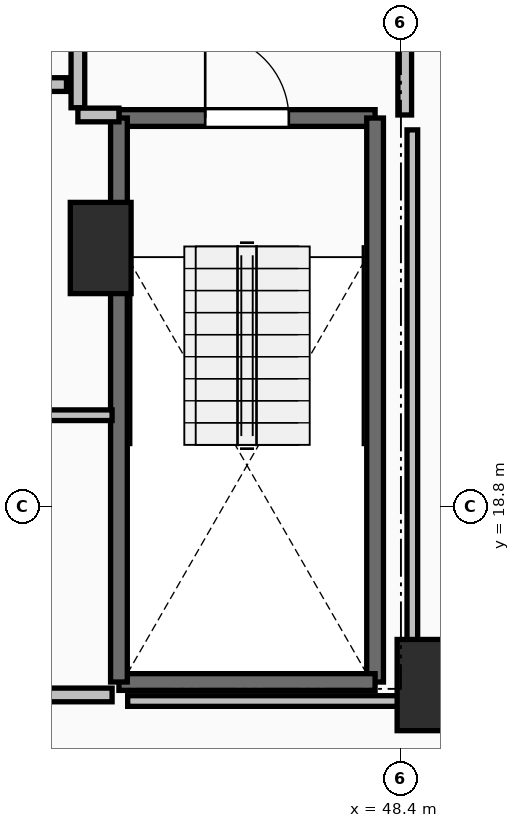
"""IFC4 building model, lengths in metres.
Left out: names, types, materials, properties, quantities, classifications, styles, units other than length and angle.
Written with IfcOpenShell. Run it as: python <this file> out.ifc"""

import sys

from ifc_helpers import new_model, si_unit, direction, frame, frame_2d, origin, origin_2d, place, context, subcontext, project, spatial, rectangle, extrude, element, fill, save


model = new_model("IFC4")
c1 = context("Model", 3, precision=1e-05, world=origin(), true_north=direction((0.0, 1.0)))
c2 = subcontext(c1, "Body", "Model", "MODEL_VIEW")
j1 = project(units=[si_unit("LENGTHUNIT", "METRE"), si_unit("PLANEANGLEUNIT", "RADIAN")], contexts=[c1])
p1 = place(None, origin())
s1 = spatial("IfcSite", under=j1, at=p1, CompositionType="ELEMENT")
p2 = place(p1, origin())
s2 = spatial("IfcBuilding", under=s1, at=p2, CompositionType="ELEMENT")
p3 = place(p2, frame((0.0, 0.0, 164.1)))
s3 = spatial("IfcBuildingStorey", under=s2, at=p3, CompositionType="ELEMENT", Elevation=164.1)
for number, where, z_axis, x_axis in (
    (1, (48.75, 16.45, 0.0), (0.0, 0.0, 1.0), (1.0, 0.0, 0.0)),
    (2, (44.45, 22.2, 0.0), (0.0, 0.0, 1.0), (1.0, 0.0, 0.0)),
):
    element("IfcColumn", number, at=place(p3, frame(where, z_axis=z_axis, x_axis=x_axis)), inside=s3, PredefinedType="PILASTER", context=c2, shape_type="SweptSolid", body=[
        extrude(rectangle(XDim=0.8, YDim=1.2, at=origin_2d()), origin(), (0.0, 0.0, 1.0), 3.5),
    ])
p4 = place(p3, frame((44.69, 23.91, 0.0), z_axis=(0.0, 0.0, 1.0), x_axis=(1.0, 0.0, 0.0)))
e3 = element("IfcWall", 3, at=p4, inside=s3, PredefinedType="SOLIDWALL", context=c2, shape_type="SweptSolid", body=[
    extrude(rectangle(XDim=3.37, YDim=0.22, at=frame_2d((1.685, 0.0))), origin(), (0.0, 0.0, 1.0), 3.24),
])
p5 = place(p4, frame((1.135, 0.0, 0.0)))
e4 = element("IfcOpeningElement", 4, at=p5, cuts=e3, PredefinedType="OPENING", context=c2, shape_type="SweptSolid", body=[
    extrude(rectangle(XDim=1.1, YDim=2.15, at=frame_2d((0.55, 1.075))), frame((0.0, 0.125, 0.0), z_axis=(0.0, -1.0, 0.0), x_axis=(1.0, 0.0, 0.0)), (0.0, 0.0, 1.0), 0.25),
])
p6 = place(p3, frame((48.06, 23.91, 0.0), z_axis=(0.0, 0.0, 1.0), x_axis=(0.0, -1.0, 0.0)))
e5 = element("IfcWall", 5, at=p6, inside=s3, PredefinedType="SOLIDWALL", context=c2, shape_type="SweptSolid", body=[
    extrude(rectangle(XDim=7.42, YDim=0.22, at=frame_2d((3.71, 0.0))), origin(), (0.0, 0.0, 1.0), 3.24),
])
p7 = place(p3, frame((48.06, 16.49, 0.0), z_axis=(0.0, 0.0, 1.0), x_axis=(-1.0, 0.0, 0.0)))
e6 = element("IfcWall", 6, at=p7, inside=s3, PredefinedType="SOLIDWALL", context=c2, shape_type="SweptSolid", body=[
    extrude(rectangle(XDim=3.37, YDim=0.22, at=frame_2d((1.685, 0.0))), origin(), (0.0, 0.0, 1.0), 3.24),
])
p8 = place(p3, frame((44.69, 16.49, 0.0), z_axis=(0.0, 0.0, 1.0), x_axis=(0.0, 1.0, 0.0)))
e7 = element("IfcWall", 7, at=p8, inside=s3, PredefinedType="SOLIDWALL", context=c2, shape_type="SweptSolid", body=[
    extrude(rectangle(XDim=7.42, YDim=0.22, at=frame_2d((3.71, 0.0))), origin(), (0.0, 0.0, 1.0), 3.24),
])
p9 = place(p3, frame((44.15, 27.955, 0.0), z_axis=(0.0, 0.0, 1.0), x_axis=(0.0, -1.0, 0.0)))
e8 = element("IfcWall", 8, at=p9, inside=s3, PredefinedType="PARTITIONING", context=c2, shape_type="SweptSolid", body=[
    extrude(rectangle(XDim=3.91, YDim=0.18, at=frame_2d((1.955, 0.0))), origin(), (0.0, 0.0, 1.0), 3.24),
])
p10 = place(p9, frame((1.355, 0.0, 0.0)))
e9 = element("IfcOpeningElement", 9, at=p10, cuts=e8, PredefinedType="OPENING", context=c2, shape_type="SweptSolid", body=[
    extrude(rectangle(XDim=1.2, YDim=2.15, at=frame_2d((0.6, 1.075))), frame((0.0, 0.105, 0.0), z_axis=(0.0, -1.0, 0.0), x_axis=(1.0, 0.0, 0.0)), (0.0, 0.0, 1.0), 0.21),
])
p11 = place(p3, frame((44.15, 23.95, 0.0), z_axis=(0.0, 0.0, 1.0), x_axis=(1.0, 0.0, 0.0)))
e10 = element("IfcWall", 10, at=p11, inside=s3, PredefinedType="PARTITIONING", context=c2, shape_type="SweptSolid", body=[
    extrude(rectangle(XDim=0.54, YDim=0.18, at=frame_2d((0.27, 0.0))), origin(), (0.0, 0.0, 1.0), 3.24),
])
p12 = place(p3, frame((48.45, 23.95, 0.0), z_axis=(0.0, 0.0, 1.0), x_axis=(0.0, 1.0, 0.0)))
e11 = element("IfcWall", 11, at=p12, inside=s3, PredefinedType="PARTITIONING", context=c2, shape_type="SweptSolid", body=[
    extrude(rectangle(XDim=4.05, YDim=0.18, at=frame_2d((2.025, 0.0))), origin(), (0.0, 0.0, 1.0), 3.24),
])
p13 = place(p12, frame((1.425, 0.0, 0.0)))
e12 = element("IfcOpeningElement", 12, at=p13, cuts=e11, PredefinedType="OPENING", context=c2, shape_type="SweptSolid", body=[
    extrude(rectangle(XDim=1.2, YDim=2.15, at=frame_2d((0.6, 1.075))), frame((0.0, 0.105, 0.0), z_axis=(0.0, -1.0, 0.0), x_axis=(1.0, 0.0, 0.0)), (0.0, 0.0, 1.0), 0.21),
])
p14 = place(p3, frame((41.555, 24.35, 0.0), z_axis=(0.0, 0.0, 1.0), x_axis=(1.0, 0.0, 0.0)))
e13 = element("IfcWall", 13, at=p14, inside=s3, PredefinedType="PARTITIONING", context=c2, shape_type="SweptSolid", body=[
    extrude(rectangle(XDim=2.445, YDim=0.18, at=frame_2d((1.223, 0.0))), origin(), (0.0, 0.0, 1.0), 3.24),
])
p15 = place(p14, frame((0.798, 0.0, 0.0)))
e14 = element("IfcOpeningElement", 14, at=p15, cuts=e13, PredefinedType="OPENING", context=c2, shape_type="SweptSolid", body=[
    extrude(rectangle(XDim=0.85, YDim=2.1, at=frame_2d((0.425, 1.05))), frame((0.0, 0.105, 0.0), z_axis=(0.0, -1.0, 0.0), x_axis=(1.0, 0.0, 0.0)), (0.0, 0.0, 1.0), 0.21),
])
p16 = place(p3, frame((44.6, 20.0, 0.0), z_axis=(0.0, 0.0, 1.0), x_axis=(-1.0, 0.0, 0.0)))
e15 = element("IfcWall", 15, at=p16, inside=s3, PredefinedType="PARTITIONING", context=c2, shape_type="SweptSolid", body=[
    extrude(rectangle(XDim=3.2, YDim=0.14, at=frame_2d((1.6, 0.0))), origin(), (0.0, 0.0, 1.0), 3.24),
])
p17 = place(p3, frame((41.4, 16.32, 0.0), z_axis=(0.0, 0.0, 1.0), x_axis=(1.0, 0.0, 0.0)))
e16 = element("IfcWall", 16, at=p17, inside=s3, PredefinedType="PARTITIONING", context=c2, shape_type="SweptSolid", body=[
    extrude(rectangle(XDim=3.2, YDim=0.18, at=frame_2d((1.6, 0.0))), origin(), (0.0, 0.0, 1.0), 3.24),
])
p18 = place(p17, frame((1.2, 0.0, 0.0)))
e17 = element("IfcOpeningElement", 17, at=p18, cuts=e16, PredefinedType="OPENING", context=c2, shape_type="SweptSolid", body=[
    extrude(rectangle(XDim=0.8, YDim=2.05, at=frame_2d((0.4, 1.025))), frame((0.0, 0.105, 0.0), z_axis=(0.0, -1.0, 0.0), x_axis=(1.0, 0.0, 0.0)), (0.0, 0.0, 1.0), 0.21),
])
p19 = place(p3, frame((48.55, 16.24, 0.0), z_axis=(0.0, 0.0, 1.0), x_axis=(0.0, 1.0, 0.0)))
e18 = element("IfcWall", 18, at=p19, inside=s3, PredefinedType="PARTITIONING", context=c2, shape_type="SweptSolid", body=[
    extrude(rectangle(XDim=7.514, YDim=0.14, at=frame_2d((3.757, 0.0))), origin(), (0.0, 0.0, 1.0), 2.432),
])
p20 = place(p3, frame((44.805, 16.24, 0.0), z_axis=(0.0, 0.0, 1.0), x_axis=(1.0, 0.0, 0.0)))
e19 = element("IfcWall", 19, at=p20, inside=s3, PredefinedType="PARTITIONING", context=c2, shape_type="SweptSolid", body=[
    extrude(rectangle(XDim=3.745, YDim=0.14, at=frame_2d((1.873, 0.0))), origin(), (0.0, 0.0, 1.0), 2.432),
])
p21 = place(p5, origin())
e20 = element("IfcDoor", 20, at=p21, inside=s3, OperationType="SINGLE_SWING_LEFT", PredefinedType="DOOR", context=c2, shape_type="SweptSolid", body=[
    extrude(rectangle(XDim=1.1, YDim=2.15, at=frame_2d((0.55, 1.075))), frame((0.0, 0.025, 0.0), z_axis=(0.0, -1.0, 0.0), x_axis=(1.0, 0.0, 0.0)), (0.0, 0.0, 1.0), 0.05),
])
fill(e4, e20)
save(model, sys.argv[1])
